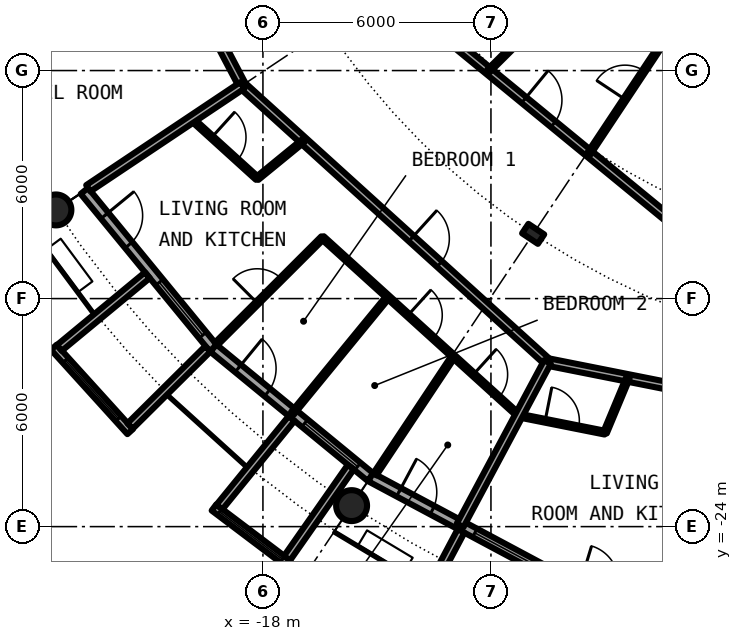
"""IFC4 building model, lengths in metres.
Left out: names, types, materials, properties, quantities, classifications, styles, units other than length and angle.
Written with IfcOpenShell. Run it as: python <this file> out.ifc"""

import sys

from ifc_helpers import new_model, si_unit, direction, frame, frame_2d, origin, origin_2d, place, context, subcontext, project, spatial, rectangle, circle, hollow_circle, i_section, extrude, element, fill, save


model = new_model("IFC4")
c1 = context("Model", 3, precision=1e-05, world=origin(), true_north=direction((0.0, 1.0)))
c2 = subcontext(c1, "Body", "Model", "MODEL_VIEW")
j1 = project(units=[si_unit("LENGTHUNIT", "METRE"), si_unit("PLANEANGLEUNIT", "RADIAN")], contexts=[c1])
p1 = place(None, origin())
s1 = spatial("IfcSite", under=j1, at=p1, CompositionType="ELEMENT")
p2 = place(p1, origin())
s2 = spatial("IfcBuilding", under=s1, at=p2, CompositionType="ELEMENT")
p3 = place(p2, frame((0.0, 0.0, 173.8)))
s3 = spatial("IfcBuildingStorey", under=s2, at=p3, CompositionType="ELEMENT", Elevation=173.8)
for number, where, z_axis, x_axis in (
    (1, (-23.448, -15.667, 0.0), (0.0, 0.0, 1.0), (1.0, 0.0, 0.0)),
    (2, (-15.667, -23.448, 0.0), (0.0, 0.0, 1.0), (1.0, 0.0, 0.0)),
):
    element("IfcColumn", number, at=place(p3, frame(where, z_axis=z_axis, x_axis=x_axis)), inside=s3, PredefinedType="COLUMN", context=c2, shape_type="SweptSolid", body=[
        extrude(hollow_circle(Radius=0.406, WallThickness=0.04, at=origin_2d()), origin(), (0.0, 0.0, 1.0), 3.05),
    ])
p4 = place(p3, frame((-10.889, -16.297, 0.0), z_axis=(0.0, 0.0, 1.0), x_axis=(-0.55557023302, -0.831469612303, 0.0)))
e3 = element("IfcColumn", 3, at=p4, inside=s3, PredefinedType="COLUMN", context=c2, shape_type="SweptSolid", body=[
    extrude(i_section(OverallWidth=0.3, OverallDepth=0.5, WebThickness=0.014, FlangeThickness=0.028, FilletRadius=0.027, at=origin_2d()), origin(), (0.0, 0.0, 1.0), 3.05),
])
p5 = place(p3, frame((-22.699, -15.167, 0.0), z_axis=(0.0, 0.0, 1.0), x_axis=(0.634382322723, -0.773019449054, 0.0)))
e4 = element("IfcWall", 4, at=p5, inside=s3, PredefinedType="SOLIDWALL", context=c2, shape_type="SweptSolid", body=[
    extrude(rectangle(XDim=5.352, YDim=0.25, at=frame_2d((2.676, 0.0))), origin(), (0.0, 0.0, 1.0), 2.7),
])
p6 = place(p5, frame((0.841, 0.0, 0.0)))
e5 = element("IfcOpeningElement", 5, at=p6, cuts=e4, PredefinedType="OPENING", context=c2, shape_type="SweptSolid", body=[
    extrude(rectangle(XDim=1.0, YDim=2.2, at=frame_2d((0.5, 1.1))), frame((0.0, 0.135, 0.0), z_axis=(0.0, -1.0, 0.0), x_axis=(1.0, 0.0, 0.0)), (0.0, 0.0, 1.0), 0.27),
])
p7 = place(p5, frame((3.111, 0.0, 0.3)))
e6 = element("IfcOpeningElement", 6, at=p7, cuts=e4, PredefinedType="OPENING", context=c2, shape_type="SweptSolid", body=[
    extrude(rectangle(XDim=1.8, YDim=2.1, at=frame_2d((0.9, 1.05))), frame((0.0, 0.135, 0.0), z_axis=(0.0, -1.0, 0.0), x_axis=(1.0, 0.0, 0.0)), (0.0, 0.0, 1.0), 0.27),
])
p8 = place(p3, frame((-23.503, -19.282, -0.03), z_axis=(0.0, 0.0, 1.0), x_axis=(0.671506829416, -0.740998365753, 0.0)))
e7 = element("IfcWall", 7, at=p8, inside=s3, PredefinedType="SOLIDWALL", context=c2, shape_type="SweptSolid", body=[
    extrude(rectangle(XDim=2.993, YDim=0.2, at=frame_2d((1.497, 0.0))), origin(), (0.0, 0.0, 1.0), 2.73),
])
p9 = place(p8, frame((0.457, 0.0, 0.33)))
e8 = element("IfcOpeningElement", 8, at=p9, cuts=e7, PredefinedType="OPENING", context=c2, shape_type="SweptSolid", body=[
    extrude(circle(Radius=1.04, at=frame_2d((1.04, 1.04))), frame((0.0, 0.11, 0.0), z_axis=(0.0, -1.0, 0.0), x_axis=(1.0, 0.0, 0.0)), (0.0, 0.0, 1.0), 0.22),
])
p10 = place(p3, frame((-21.041, -17.384, -0.03), z_axis=(0.0, 0.0, 1.0), x_axis=(-0.770784861449, -0.63709551667, 0.0)))
e9 = element("IfcWall", 9, at=p10, inside=s3, PredefinedType="SOLIDWALL", context=c2, shape_type="SweptSolid", body=[
    extrude(rectangle(XDim=3.006, YDim=0.2, at=frame_2d((1.503, 0.0))), origin(), (0.0, 0.0, 1.0), 2.73),
])
p11 = place(p3, frame((-19.45, -19.323, -0.03), z_axis=(0.0, 0.0, 1.0), x_axis=(-0.709727076896, -0.704476739375, 0.0)))
e10 = element("IfcWall", 10, at=p11, inside=s3, PredefinedType="SOLIDWALL", context=c2, shape_type="SweptSolid", body=[
    extrude(rectangle(XDim=2.883, YDim=0.2, at=frame_2d((1.441, 0.0))), origin(), (0.0, 0.0, 1.0), 2.73),
])
p12 = place(p3, frame((-19.304, -19.304, 0.0), z_axis=(0.0, 0.0, 1.0), x_axis=(0.773019449054, -0.634382322723, 0.0)))
e11 = element("IfcWall", 11, at=p12, inside=s3, PredefinedType="SOLIDWALL", context=c2, shape_type="SweptSolid", body=[
    extrude(rectangle(XDim=5.352, YDim=0.25, at=frame_2d((2.676, 0.0))), origin(), (0.0, 0.0, 1.0), 2.7),
])
p13 = place(p12, frame((0.841, 0.0, 0.0)))
e12 = element("IfcOpeningElement", 12, at=p13, cuts=e11, PredefinedType="OPENING", context=c2, shape_type="SweptSolid", body=[
    extrude(rectangle(XDim=1.0, YDim=2.2, at=frame_2d((0.5, 1.1))), frame((0.0, 0.135, 0.0), z_axis=(0.0, -1.0, 0.0), x_axis=(1.0, 0.0, 0.0)), (0.0, 0.0, 1.0), 0.27),
])
p14 = place(p12, frame((3.111, 0.0, 0.3)))
e13 = element("IfcOpeningElement", 13, at=p14, cuts=e11, PredefinedType="OPENING", context=c2, shape_type="SweptSolid", body=[
    extrude(rectangle(XDim=1.8, YDim=2.1, at=frame_2d((0.9, 1.05))), frame((0.0, 0.135, 0.0), z_axis=(0.0, -1.0, 0.0), x_axis=(1.0, 0.0, 0.0)), (0.0, 0.0, 1.0), 0.27),
])
p15 = place(p3, frame((-19.289, -23.497, -0.03), z_axis=(0.0, 0.0, 1.0), x_axis=(0.797887588059, -0.602806268067, 0.0)))
e14 = element("IfcWall", 14, at=p15, inside=s3, PredefinedType="SOLIDWALL", context=c2, shape_type="SweptSolid", body=[
    extrude(rectangle(XDim=2.447, YDim=0.2, at=frame_2d((1.223, 0.0))), origin(), (0.0, 0.0, 1.0), 2.73),
])
p16 = place(p15, frame((0.183, 0.0, 0.33)))
e15 = element("IfcOpeningElement", 15, at=p16, cuts=e14, PredefinedType="OPENING", context=c2, shape_type="SweptSolid", body=[
    extrude(circle(Radius=1.04, at=frame_2d((1.04, 1.04))), frame((0.0, 0.11, 0.0), z_axis=(0.0, -1.0, 0.0), x_axis=(1.0, 0.0, 0.0)), (0.0, 0.0, 1.0), 0.22),
])
p17 = place(p3, frame((-17.246, -21.155, -0.03), z_axis=(0.0, 0.0, 1.0), x_axis=(-0.631741648902, -0.775179004516, 0.0)))
e16 = element("IfcWall", 16, at=p17, inside=s3, PredefinedType="SOLIDWALL", context=c2, shape_type="SweptSolid", body=[
    extrude(rectangle(XDim=3.006, YDim=0.2, at=frame_2d((1.503, 0.0))), origin(), (0.0, 0.0, 1.0), 2.73),
])
p18 = place(p3, frame((-15.688, -22.433, -0.03), z_axis=(0.0, 0.0, 1.0), x_axis=(-0.573260687834, -0.819373043115, 0.0)))
e17 = element("IfcWall", 17, at=p18, inside=s3, PredefinedType="SOLIDWALL", context=c2, shape_type="SweptSolid", body=[
    extrude(rectangle(XDim=2.925, YDim=0.2, at=frame_2d((1.463, 0.0))), origin(), (0.0, 0.0, 1.0), 2.73),
])
p19 = place(p3, frame((-15.167, -22.699, 0.0), z_axis=(0.0, 0.0, 1.0), x_axis=(0.881915646801, -0.471407246368, 0.0)))
e18 = element("IfcWall", 18, at=p19, inside=s3, PredefinedType="SOLIDWALL", context=c2, shape_type="SweptSolid", body=[
    extrude(rectangle(XDim=5.352, YDim=0.25, at=frame_2d((2.676, 0.0))), origin(), (0.0, 0.0, 1.0), 2.7),
])
p20 = place(p19, frame((0.841, 0.0, 0.0)))
e19 = element("IfcOpeningElement", 19, at=p20, cuts=e18, PredefinedType="OPENING", context=c2, shape_type="SweptSolid", body=[
    extrude(rectangle(XDim=1.0, YDim=2.2, at=frame_2d((0.5, 1.1))), frame((0.0, 0.135, 0.0), z_axis=(0.0, -1.0, 0.0), x_axis=(1.0, 0.0, 0.0)), (0.0, 0.0, 1.0), 0.27),
])
p21 = place(p19, frame((3.111, 0.0, 0.3)))
e20 = element("IfcOpeningElement", 20, at=p21, cuts=e18, PredefinedType="OPENING", context=c2, shape_type="SweptSolid", body=[
    extrude(rectangle(XDim=1.8, YDim=2.1, at=frame_2d((0.9, 1.05))), frame((0.0, 0.135, 0.0), z_axis=(0.0, -1.0, 0.0), x_axis=(1.0, 0.0, 0.0)), (0.0, 0.0, 1.0), 0.27),
])
p22 = place(p3, frame((-12.787, -24.113, -0.03), z_axis=(0.0, 0.0, 1.0), x_axis=(-0.468365282436, -0.883534924159, 0.0)))
e21 = element("IfcWall", 21, at=p22, inside=s3, PredefinedType="SOLIDWALL", context=c2, shape_type="SweptSolid", body=[
    extrude(rectangle(XDim=3.006, YDim=0.2, at=frame_2d((1.503, 0.0))), origin(), (0.0, 0.0, 1.0), 2.73),
])
p23 = place(p3, frame((-19.872, -13.278, 0.0), z_axis=(0.0, 0.0, 1.0), x_axis=(0.740990220108, -0.671515817911, 0.0)))
e22 = element("IfcWall", 22, at=p23, inside=s3, PredefinedType="PARTITIONING", context=c2, shape_type="SweptSolid", body=[
    extrude(rectangle(XDim=2.323, YDim=0.1, at=frame_2d((1.161, 0.0))), origin(), (0.0, 0.0, 1.0), 2.7),
])
p24 = place(p23, frame((0.711, 0.0, 0.0)))
e23 = element("IfcOpeningElement", 23, at=p24, cuts=e22, PredefinedType="OPENING", context=c2, shape_type="SweptSolid", body=[
    extrude(rectangle(XDim=0.9, YDim=2.3, at=frame_2d((0.45, 1.15))), frame((0.0, 0.06, 0.0), z_axis=(0.0, -1.0, 0.0), x_axis=(1.0, 0.0, 0.0)), (0.0, 0.0, 1.0), 0.12),
])
p25 = place(p3, frame((-16.432, -16.396, 0.0), z_axis=(0.0, 0.0, 1.0), x_axis=(0.740901429238, -0.671613781986, 0.0)))
e24 = element("IfcWall", 24, at=p25, inside=s3, PredefinedType="PARTITIONING", context=c2, shape_type="SweptSolid", body=[
    extrude(rectangle(XDim=6.97, YDim=0.1, at=frame_2d((3.485, 0.0))), origin(), (0.0, 0.0, 1.0), 2.7),
])
p26 = place(p25, frame((3.038, 0.0, 0.0)))
e25 = element("IfcOpeningElement", 25, at=p26, cuts=e24, PredefinedType="OPENING", context=c2, shape_type="SweptSolid", body=[
    extrude(rectangle(XDim=0.9, YDim=2.3, at=frame_2d((0.45, 1.15))), frame((0.0, 0.06, 0.0), z_axis=(0.0, -1.0, 0.0), x_axis=(1.0, 0.0, 0.0)), (0.0, 0.0, 1.0), 0.12),
])
p27 = place(p25, frame((5.36, 0.0, 0.0)))
e26 = element("IfcOpeningElement", 26, at=p27, cuts=e24, PredefinedType="OPENING", context=c2, shape_type="SweptSolid", body=[
    extrude(rectangle(XDim=0.9, YDim=2.3, at=frame_2d((0.45, 1.15))), frame((0.0, 0.06, 0.0), z_axis=(0.0, -1.0, 0.0), x_axis=(1.0, 0.0, 0.0)), (0.0, 0.0, 1.0), 0.12),
])
p28 = place(p3, frame((-11.268, -21.077, 0.0), z_axis=(0.0, 0.0, 1.0), x_axis=(0.980783177308, -0.19510089469, 0.0)))
e27 = element("IfcWall", 27, at=p28, inside=s3, PredefinedType="PARTITIONING", context=c2, shape_type="SweptSolid", body=[
    extrude(rectangle(XDim=2.312, YDim=0.1, at=frame_2d((1.156, 0.0))), origin(), (0.0, 0.0, 1.0), 2.7),
])
p29 = place(p28, frame((0.708, 0.0, 0.0)))
e28 = element("IfcOpeningElement", 28, at=p29, cuts=e27, PredefinedType="OPENING", context=c2, shape_type="SweptSolid", body=[
    extrude(rectangle(XDim=0.9, YDim=2.3, at=frame_2d((0.45, 1.15))), frame((0.0, 0.06, 0.0), z_axis=(0.0, -1.0, 0.0), x_axis=(1.0, 0.0, 0.0)), (0.0, 0.0, 1.0), 0.12),
])
p30 = place(p3, frame((-19.307, -10.935, 0.0), z_axis=(0.0, 0.0, 1.0), x_axis=(0.465605550524, -0.884992356646, 0.0)))
e29 = element("IfcWall", 29, at=p30, inside=s3, PredefinedType="PARTITIONING", context=c2, shape_type="SweptSolid", body=[
    extrude(rectangle(XDim=1.643, YDim=0.2, at=frame_2d((0.821, 0.0))), origin(), (0.0, 0.0, 1.0), 2.7),
])
p31 = place(p3, frame((-18.542, -12.389, 0.0), z_axis=(0.0, 0.0, 1.0), x_axis=(0.740947367223, -0.671563101283, 0.0)))
e30 = element("IfcWall", 30, at=p31, inside=s3, PredefinedType="PARTITIONING", context=c2, shape_type="SweptSolid", body=[
    extrude(rectangle(XDim=10.837, YDim=0.2, at=frame_2d((5.419, 0.0))), origin(), (0.0, 0.0, 1.0), 2.7),
])
p32 = place(p31, frame((6.002, 0.0, 0.0)))
e31 = element("IfcOpeningElement", 31, at=p32, cuts=e30, PredefinedType="OPENING", context=c2, shape_type="SweptSolid", body=[
    extrude(rectangle(XDim=1.0, YDim=2.3, at=frame_2d((0.5, 1.15))), frame((0.0, 0.11, 0.0), z_axis=(0.0, -1.0, 0.0), x_axis=(1.0, 0.0, 0.0)), (0.0, 0.0, 1.0), 0.22),
])
p33 = place(p3, frame((-10.512, -19.667, 0.0), z_axis=(0.0, 0.0, 1.0), x_axis=(0.980780341017, -0.195115152343, 0.0)))
e32 = element("IfcWall", 32, at=p33, inside=s3, PredefinedType="PARTITIONING", context=c2, shape_type="SweptSolid", body=[
    extrude(rectangle(XDim=12.947, YDim=0.2, at=frame_2d((6.473, 0.0))), origin(), (0.0, 0.0, 1.0), 2.7),
])
p34 = place(p33, frame((7.052, 0.0, 0.0)))
e33 = element("IfcOpeningElement", 33, at=p34, cuts=e32, PredefinedType="OPENING", context=c2, shape_type="SweptSolid", body=[
    extrude(rectangle(XDim=1.0, YDim=2.3, at=frame_2d((0.5, 1.15))), frame((0.0, 0.11, 0.0), z_axis=(0.0, -1.0, 0.0), x_axis=(1.0, 0.0, 0.0)), (0.0, 0.0, 1.0), 0.22),
])
p35 = place(p3, frame((-14.717, -9.834, 0.0), z_axis=(0.0, 0.0, 1.0), x_axis=(0.773034536097, -0.634363938131, 0.0)))
e34 = element("IfcWall", 34, at=p35, inside=s3, PredefinedType="PARTITIONING", context=c2, shape_type="SweptSolid", body=[
    extrude(rectangle(XDim=10.277, YDim=0.2, at=frame_2d((5.138, 0.0))), origin(), (0.0, 0.0, 1.0), 2.7),
])
p36 = place(p35, frame((4.638, 0.0, 0.0)))
e35 = element("IfcOpeningElement", 35, at=p36, cuts=e34, PredefinedType="OPENING", context=c2, shape_type="SweptSolid", body=[
    extrude(rectangle(XDim=1.0, YDim=2.3, at=frame_2d((0.5, 1.15))), frame((0.0, 0.11, 0.0), z_axis=(0.0, -1.0, 0.0), x_axis=(1.0, 0.0, 0.0)), (0.0, 0.0, 1.0), 0.22),
])
p37 = place(p3, frame((-22.595, -15.098, 0.0), z_axis=(0.0, 0.0, 1.0), x_axis=(0.831387096605, 0.55569370664, 0.0)))
e36 = element("IfcWall", 36, at=p37, inside=s3, PredefinedType="PARTITIONING", context=c2, shape_type="SweptSolid", body=[
    extrude(rectangle(XDim=4.875, YDim=0.2, at=frame_2d((2.438, 0.0))), origin(), (0.0, 0.0, 1.0), 2.7),
])
p38 = place(p3, frame((-19.234, -19.197, 0.0), z_axis=(0.0, 0.0, 1.0), x_axis=(0.707722727509, 0.706490297858, 0.0)))
e37 = element("IfcWall", 37, at=p38, inside=s3, PredefinedType="PARTITIONING", context=c2, shape_type="SweptSolid", body=[
    extrude(rectangle(XDim=3.962, YDim=0.1, at=frame_2d((1.981, 0.0))), origin(), (0.0, 0.0, 1.0), 2.7),
])
p39 = place(p38, frame((1.531, 0.0, 0.0)))
e38 = element("IfcOpeningElement", 38, at=p39, cuts=e37, PredefinedType="OPENING", context=c2, shape_type="SweptSolid", body=[
    extrude(rectangle(XDim=0.9, YDim=2.3, at=frame_2d((0.45, 1.15))), frame((0.0, 0.06, 0.0), z_axis=(0.0, -1.0, 0.0), x_axis=(1.0, 0.0, 0.0)), (0.0, 0.0, 1.0), 0.12),
])
p40 = place(p3, frame((-18.151, -14.838, 0.0), z_axis=(0.0, 0.0, 1.0), x_axis=(0.774283039722, 0.632839453889, 0.0)))
e39 = element("IfcWall", 39, at=p40, inside=s3, PredefinedType="PARTITIONING", context=c2, shape_type="SweptSolid", body=[
    extrude(rectangle(XDim=1.569, YDim=0.1, at=frame_2d((0.785, 0.0))), origin(), (0.0, 0.0, 1.0), 2.7),
])
p41 = place(p3, frame((-17.223, -21.02, 0.0), z_axis=(0.0, 0.0, 1.0), x_axis=(0.633858457021, 0.773449065203, 0.0)))
e40 = element("IfcWall", 40, at=p41, inside=s3, PredefinedType="PARTITIONING", context=c2, shape_type="SweptSolid", body=[
    extrude(rectangle(XDim=3.961, YDim=0.1, at=frame_2d((1.981, 0.0))), origin(), (0.0, 0.0, 1.0), 2.7),
])
p42 = place(p3, frame((-15.054, -22.624, 0.0), z_axis=(0.0, 0.0, 1.0), x_axis=(0.553823887887, 0.83263383381, 0.0)))
e41 = element("IfcWall", 41, at=p42, inside=s3, PredefinedType="PARTITIONING", context=c2, shape_type="SweptSolid", body=[
    extrude(rectangle(XDim=3.73, YDim=0.1, at=frame_2d((1.865, 0.0))), origin(), (0.0, 0.0, 1.0), 2.7),
])
p43 = place(p3, frame((-12.81, -23.966, 0.0), z_axis=(0.0, 0.0, 1.0), x_axis=(0.471427642527, 0.881904744211, 0.0)))
e42 = element("IfcWall", 42, at=p43, inside=s3, PredefinedType="PARTITIONING", context=c2, shape_type="SweptSolid", body=[
    extrude(rectangle(XDim=4.875, YDim=0.2, at=frame_2d((2.438, 0.0))), origin(), (0.0, 0.0, 1.0), 2.7),
])
p44 = place(p3, frame((-12.065, -12.011, 0.0), z_axis=(0.0, 0.0, 1.0), x_axis=(0.708793214553, 0.705416316088, 0.0)))
e43 = element("IfcWall", 43, at=p44, inside=s3, PredefinedType="PARTITIONING", context=c2, shape_type="SweptSolid", body=[
    extrude(rectangle(XDim=4.121, YDim=0.1, at=frame_2d((2.061, 0.0))), origin(), (0.0, 0.0, 1.0), 2.7),
])
p45 = place(p44, frame((1.611, 0.0, 0.0)))
e44 = element("IfcOpeningElement", 44, at=p45, cuts=e43, PredefinedType="OPENING", context=c2, shape_type="SweptSolid", body=[
    extrude(rectangle(XDim=0.9, YDim=2.3, at=frame_2d((0.45, 1.15))), frame((0.0, 0.06, 0.0), z_axis=(0.0, -1.0, 0.0), x_axis=(1.0, 0.0, 0.0)), (0.0, 0.0, 1.0), 0.12),
])
p46 = place(p3, frame((-9.418, -14.182, 0.0), z_axis=(0.0, 0.0, 1.0), x_axis=(0.553303732327, 0.832979579457, 0.0)))
e45 = element("IfcWall", 45, at=p46, inside=s3, PredefinedType="PARTITIONING", context=c2, shape_type="SweptSolid", body=[
    extrude(rectangle(XDim=4.319, YDim=0.1, at=frame_2d((2.16, 0.0))), origin(), (0.0, 0.0, 1.0), 2.7),
])
p47 = place(p46, frame((1.71, 0.0, 0.0)))
e46 = element("IfcOpeningElement", 46, at=p47, cuts=e45, PredefinedType="OPENING", context=c2, shape_type="SweptSolid", body=[
    extrude(rectangle(XDim=0.9, YDim=2.3, at=frame_2d((0.45, 1.15))), frame((0.0, 0.06, 0.0), z_axis=(0.0, -1.0, 0.0), x_axis=(1.0, 0.0, 0.0)), (0.0, 0.0, 1.0), 0.12),
])
p48 = place(p3, frame((-8.998, -21.529, 0.0), z_axis=(0.0, 0.0, 1.0), x_axis=(0.385469858593, 0.922720427929, 0.0)))
e47 = element("IfcWall", 47, at=p48, inside=s3, PredefinedType="PARTITIONING", context=c2, shape_type="SweptSolid", body=[
    extrude(rectangle(XDim=1.562, YDim=0.1, at=frame_2d((0.781, 0.0))), origin(), (0.0, 0.0, 1.0), 2.7),
])
p49 = place(p6, origin())
e48 = element("IfcDoor", 48, at=p49, inside=s3, OperationType="SINGLE_SWING_LEFT", PredefinedType="DOOR", context=c2, shape_type="SweptSolid", body=[
    extrude(rectangle(XDim=1.0, YDim=2.2, at=frame_2d((0.5, 1.1))), frame((0.0, 0.025, 0.0), z_axis=(0.0, -1.0, 0.0), x_axis=(1.0, 0.0, 0.0)), (0.0, 0.0, 1.0), 0.05),
])
fill(e5, e48)
p50 = place(p7, origin())
e49 = element("IfcWindow", 49, at=p50, inside=s3, PartitioningType="SINGLE_PANEL", PredefinedType="WINDOW", context=c2, shape_type="SweptSolid", body=[
    extrude(rectangle(XDim=1.8, YDim=2.1, at=frame_2d((0.9, 1.05))), frame((0.0, 0.03, 0.0), z_axis=(0.0, -1.0, 0.0), x_axis=(1.0, 0.0, 0.0)), (0.0, 0.0, 1.0), 0.06),
])
fill(e6, e49)
p51 = place(p9, origin())
e50 = element("IfcWindow", 50, at=p51, inside=s3, PartitioningType="SINGLE_PANEL", PredefinedType="WINDOW", context=c2, shape_type="SweptSolid", body=[
    extrude(circle(Radius=1.04, at=frame_2d((1.04, 1.04))), frame((0.0, 0.03, 0.0), z_axis=(0.0, -1.0, 0.0), x_axis=(1.0, 0.0, 0.0)), (0.0, 0.0, 1.0), 0.06),
])
fill(e8, e50)
p52 = place(p13, origin())
e51 = element("IfcDoor", 51, at=p52, inside=s3, OperationType="SINGLE_SWING_LEFT", PredefinedType="DOOR", context=c2, shape_type="SweptSolid", body=[
    extrude(rectangle(XDim=1.0, YDim=2.2, at=frame_2d((0.5, 1.1))), frame((0.0, 0.025, 0.0), z_axis=(0.0, -1.0, 0.0), x_axis=(1.0, 0.0, 0.0)), (0.0, 0.0, 1.0), 0.05),
])
fill(e12, e51)
p53 = place(p14, origin())
e52 = element("IfcWindow", 52, at=p53, inside=s3, PartitioningType="SINGLE_PANEL", PredefinedType="WINDOW", context=c2, shape_type="SweptSolid", body=[
    extrude(rectangle(XDim=1.8, YDim=2.1, at=frame_2d((0.9, 1.05))), frame((0.0, 0.03, 0.0), z_axis=(0.0, -1.0, 0.0), x_axis=(1.0, 0.0, 0.0)), (0.0, 0.0, 1.0), 0.06),
])
fill(e13, e52)
p54 = place(p16, origin())
e53 = element("IfcWindow", 53, at=p54, inside=s3, PartitioningType="SINGLE_PANEL", PredefinedType="WINDOW", context=c2, shape_type="SweptSolid", body=[
    extrude(circle(Radius=1.04, at=frame_2d((1.04, 1.04))), frame((0.0, 0.03, 0.0), z_axis=(0.0, -1.0, 0.0), x_axis=(1.0, 0.0, 0.0)), (0.0, 0.0, 1.0), 0.06),
])
fill(e15, e53)
p55 = place(p20, origin())
e54 = element("IfcDoor", 54, at=p55, inside=s3, OperationType="SINGLE_SWING_LEFT", PredefinedType="DOOR", context=c2, shape_type="SweptSolid", body=[
    extrude(rectangle(XDim=1.0, YDim=2.2, at=frame_2d((0.5, 1.1))), frame((0.0, 0.025, 0.0), z_axis=(0.0, -1.0, 0.0), x_axis=(1.0, 0.0, 0.0)), (0.0, 0.0, 1.0), 0.05),
])
fill(e19, e54)
p56 = place(p21, origin())
e55 = element("IfcWindow", 55, at=p56, inside=s3, PartitioningType="SINGLE_PANEL", PredefinedType="WINDOW", context=c2, shape_type="SweptSolid", body=[
    extrude(rectangle(XDim=1.8, YDim=2.1, at=frame_2d((0.9, 1.05))), frame((0.0, 0.03, 0.0), z_axis=(0.0, -1.0, 0.0), x_axis=(1.0, 0.0, 0.0)), (0.0, 0.0, 1.0), 0.06),
])
fill(e20, e55)
p57 = place(p32, origin())
e56 = element("IfcDoor", 56, at=p57, inside=s3, OperationType="SINGLE_SWING_RIGHT", PredefinedType="DOOR", context=c2, shape_type="SweptSolid", body=[
    extrude(rectangle(XDim=1.0, YDim=2.3, at=frame_2d((0.5, 1.15))), frame((0.0, 0.025, 0.0), z_axis=(0.0, -1.0, 0.0), x_axis=(1.0, 0.0, 0.0)), (0.0, 0.0, 1.0), 0.05),
])
fill(e31, e56)
p58 = place(p24, origin())
e57 = element("IfcDoor", 57, at=p58, inside=s3, OperationType="SINGLE_SWING_RIGHT", PredefinedType="DOOR", context=c2, shape_type="SweptSolid", body=[
    extrude(rectangle(XDim=0.9, YDim=2.3, at=frame_2d((0.45, 1.15))), frame((0.0, 0.025, 0.0), z_axis=(0.0, -1.0, 0.0), x_axis=(1.0, 0.0, 0.0)), (0.0, 0.0, 1.0), 0.05),
])
fill(e23, e57)
p59 = place(p39, origin())
e58 = element("IfcDoor", 58, at=p59, inside=s3, OperationType="SINGLE_SWING_LEFT", PredefinedType="DOOR", context=c2, shape_type="SweptSolid", body=[
    extrude(rectangle(XDim=0.9, YDim=2.3, at=frame_2d((0.45, 1.15))), frame((0.0, 0.025, 0.0), z_axis=(0.0, -1.0, 0.0), x_axis=(1.0, 0.0, 0.0)), (0.0, 0.0, 1.0), 0.05),
])
fill(e38, e58)
p60 = place(p26, origin())
e59 = element("IfcDoor", 59, at=p60, inside=s3, OperationType="SINGLE_SWING_RIGHT", PredefinedType="DOOR", context=c2, shape_type="SweptSolid", body=[
    extrude(rectangle(XDim=0.9, YDim=2.3, at=frame_2d((0.45, 1.15))), frame((0.0, 0.025, 0.0), z_axis=(0.0, -1.0, 0.0), x_axis=(1.0, 0.0, 0.0)), (0.0, 0.0, 1.0), 0.05),
])
fill(e25, e59)
p61 = place(p27, origin())
e60 = element("IfcDoor", 60, at=p61, inside=s3, OperationType="SINGLE_SWING_RIGHT", PredefinedType="DOOR", context=c2, shape_type="SweptSolid", body=[
    extrude(rectangle(XDim=0.9, YDim=2.3, at=frame_2d((0.45, 1.15))), frame((0.0, 0.025, 0.0), z_axis=(0.0, -1.0, 0.0), x_axis=(1.0, 0.0, 0.0)), (0.0, 0.0, 1.0), 0.05),
])
fill(e26, e60)
p62 = place(p29, origin())
e61 = element("IfcDoor", 61, at=p62, inside=s3, OperationType="SINGLE_SWING_RIGHT", PredefinedType="DOOR", context=c2, shape_type="SweptSolid", body=[
    extrude(rectangle(XDim=0.9, YDim=2.3, at=frame_2d((0.45, 1.15))), frame((0.0, 0.025, 0.0), z_axis=(0.0, -1.0, 0.0), x_axis=(1.0, 0.0, 0.0)), (0.0, 0.0, 1.0), 0.05),
])
fill(e28, e61)
p63 = place(p36, origin())
e62 = element("IfcDoor", 62, at=p63, inside=s3, OperationType="SINGLE_SWING_LEFT", PredefinedType="DOOR", context=c2, shape_type="SweptSolid", body=[
    extrude(rectangle(XDim=1.0, YDim=2.3, at=frame_2d((0.5, 1.15))), frame((0.0, 0.025, 0.0), z_axis=(0.0, -1.0, 0.0), x_axis=(1.0, 0.0, 0.0)), (0.0, 0.0, 1.0), 0.05),
])
fill(e35, e62)
p64 = place(p47, origin())
e63 = element("IfcDoor", 63, at=p64, inside=s3, OperationType="SINGLE_SWING_RIGHT", PredefinedType="DOOR", context=c2, shape_type="SweptSolid", body=[
    extrude(rectangle(XDim=0.9, YDim=2.3, at=frame_2d((0.45, 1.15))), frame((0.0, 0.025, 0.0), z_axis=(0.0, -1.0, 0.0), x_axis=(1.0, 0.0, 0.0)), (0.0, 0.0, 1.0), 0.05),
])
fill(e46, e63)
save(model, sys.argv[1])
